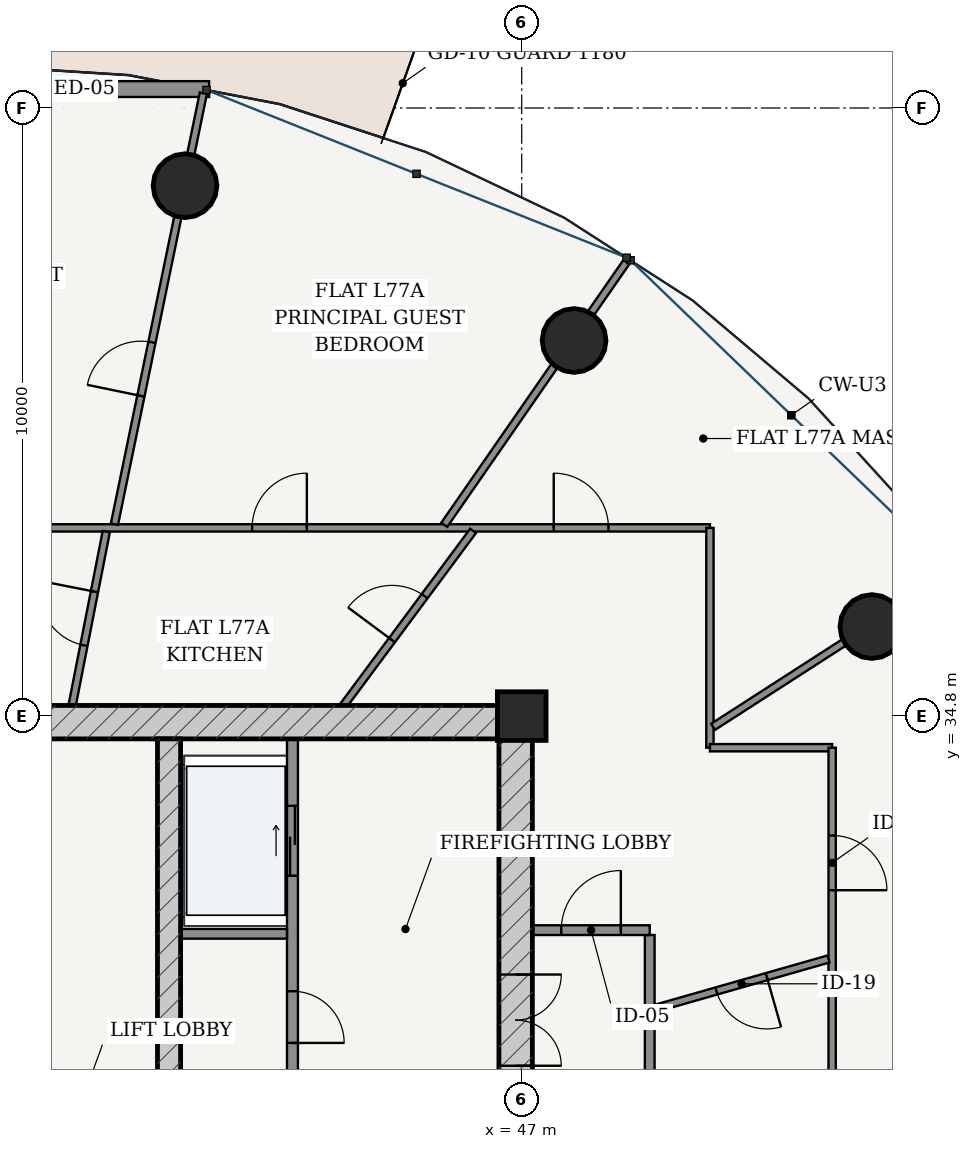
"""IFC4 building model, lengths in metres.
Left out: names, types, materials, properties, quantities, classifications, styles, units other than length and angle.
Written with IfcOpenShell. Run it as: python <this file> out.ifc"""

import sys

from ifc_helpers import new_model, si_unit, direction, frame, frame_2d, origin, origin_2d, place, context, subcontext, project, spatial, rectangle, hollow_circle, extrude, source, transform, mapped, element, fill, save


model = new_model("IFC4")
c1 = context("Model", 3, precision=1e-05, world=origin(), true_north=direction((-0.2419218956, 0.970295726276)))
c2 = subcontext(c1, "Body", "Model", "MODEL_VIEW")
j1 = project(units=[si_unit("LENGTHUNIT", "METRE"), si_unit("PLANEANGLEUNIT", "RADIAN")], contexts=[c1])
p1 = place(None, origin())
s1 = spatial("IfcSite", under=j1, at=p1, CompositionType="ELEMENT")
p2 = place(p1, origin())
s2 = spatial("IfcBuilding", under=s1, at=p2, CompositionType="ELEMENT")
p3 = place(p2, frame((0.0, 0.0, 293.2)))
s3 = spatial("IfcBuildingStorey", under=s2, at=p3, CompositionType="ELEMENT", Elevation=293.2)
p4 = place(p3, frame((47.0, 34.8, 0.0), z_axis=(0.0, 0.0, 1.0), x_axis=(1.0, 0.0, 0.0)))
e1 = element("IfcColumn", 1, at=p4, inside=s3, PredefinedType="COLUMN", context=c2, shape_type="SweptSolid", body=[
    extrude(rectangle(XDim=0.8, YDim=0.8, at=origin_2d()), origin(), (0.0, 0.0, 1.0), 3.75),
])
p5 = place(p3, frame((28.825, 34.7, 0.0), z_axis=(0.0, 0.0, 1.0), x_axis=(1.0, 0.0, 0.0)))
e2 = element("IfcWall", 2, at=p5, inside=s3, PredefinedType="SHEAR", context=c2, shape_type="SweptSolid", body=[
    extrude(rectangle(XDim=18.35, YDim=0.55, at=frame_2d((9.175, 0.0))), origin(), (0.0, 0.0, 1.0), 3.49),
])
p6 = place(p3, frame((46.9, 19.175, 0.0), z_axis=(0.0, 0.0, 1.0), x_axis=(0.0, 1.0, 0.0)))
e3 = element("IfcWall", 3, at=p6, inside=s3, PredefinedType="SHEAR", context=c2, shape_type="SweptSolid", body=[
    extrude(rectangle(XDim=15.25, YDim=0.55, at=frame_2d((7.625, 0.0))), origin(), (0.0, 0.0, 1.0), 3.49),
])
p7 = place(p6, frame((9.875, 0.0, 0.0)))
e4 = element("IfcOpeningElement", 4, at=p7, cuts=e3, PredefinedType="OPENING", context=c2, shape_type="SweptSolid", body=[
    extrude(rectangle(XDim=1.5, YDim=2.2, at=frame_2d((0.75, 1.1))), frame((0.0, 0.285, 0.0), z_axis=(0.0, -1.0, 0.0), x_axis=(1.0, 0.0, 0.0)), (0.0, 0.0, 1.0), 0.57),
])
p8 = place(p3, frame((41.2, 19.175, 0.0), z_axis=(0.0, 0.0, 1.0), x_axis=(0.0, 1.0, 0.0)))
e5 = element("IfcWall", 5, at=p8, inside=s3, PredefinedType="SHEAR", context=c2, shape_type="SweptSolid", body=[
    extrude(rectangle(XDim=15.25, YDim=0.38, at=frame_2d((7.625, 0.0))), origin(), (0.0, 0.0, 1.0), 3.49),
])
p9 = place(p8, frame((7.8, 0.0, 0.0)))
e6 = element("IfcOpeningElement", 6, at=p9, cuts=e5, PredefinedType="OPENING", context=c2, shape_type="SweptSolid", body=[
    extrude(rectangle(XDim=1.05, YDim=2.15, at=frame_2d((0.525, 1.075))), frame((0.0, 0.2, 0.0), z_axis=(0.0, -1.0, 0.0), x_axis=(1.0, 0.0, 0.0)), (0.0, 0.0, 1.0), 0.4),
])
for number, where, z_axis, x_axis in (
    (7, (52.759, 36.272, 0.0), (0.0, 0.0, 1.0), (1.0, 0.0, 0.0)),
    (8, (47.861, 40.977, 0.0), (0.0, 0.0, 1.0), (1.0, 0.0, 0.0)),
    (9, (41.463, 43.522, 0.0), (0.0, 0.0, 1.0), (1.0, 0.0, 0.0)),
):
    element("IfcColumn", number, at=place(p3, frame(where, z_axis=z_axis, x_axis=x_axis)), inside=s3, PredefinedType="COLUMN", context=c2, shape_type="SweptSolid", body=[
        extrude(hollow_circle(Radius=0.525, WallThickness=0.035, at=origin_2d()), origin(), (0.0, 0.0, 1.0), 3.75),
    ])
p10 = place(p3, frame((41.859, 45.111, 0.0), z_axis=(0.0, 0.0, 1.0), x_axis=(-1.0, 0.0, 0.0)))
e10 = element("IfcWall", 10, at=p10, inside=s3, PredefinedType="SOLIDWALL", context=c2, shape_type="SweptSolid", body=[
    extrude(rectangle(XDim=7.718, YDim=0.26, at=frame_2d((3.859, 0.0))), origin(), (0.0, 0.0, 1.0), 3.49),
])
p11 = place(p10, frame((3.184, 0.0, 0.0)))
e11 = element("IfcOpeningElement", 11, at=p11, cuts=e10, PredefinedType="OPENING", context=c2, shape_type="SweptSolid", body=[
    extrude(rectangle(XDim=1.35, YDim=2.2, at=frame_2d((0.675, 1.1))), frame((0.0, 0.14, 0.0), z_axis=(0.0, -1.0, 0.0), x_axis=(1.0, 0.0, 0.0)), (0.0, 0.0, 1.0), 0.28),
])
p12 = place(p3, frame((43.23, 28.52, 0.0), z_axis=(0.0, 0.0, 1.0), x_axis=(0.0, 1.0, 0.0)))
e12 = element("IfcWall", 12, at=p12, inside=s3, PredefinedType="PARTITIONING", context=c2, shape_type="SweptSolid", body=[
    extrude(rectangle(XDim=5.905, YDim=0.18, at=frame_2d((2.953, 0.0))), origin(), (0.0, 0.0, 1.0), 3.49),
])
p13 = place(p12, frame((0.905, 0.0, 0.0)))
e13 = element("IfcOpeningElement", 13, at=p13, cuts=e12, PredefinedType="OPENING", context=c2, shape_type="SweptSolid", body=[
    extrude(rectangle(XDim=0.85, YDim=2.1, at=frame_2d((0.425, 1.05))), frame((0.0, 0.1, 0.0), z_axis=(0.0, -1.0, 0.0), x_axis=(1.0, 0.0, 0.0)), (0.0, 0.0, 1.0), 0.2),
])
p14 = place(p12, frame((3.655, 0.0, 0.0)))
e14 = element("IfcOpeningElement", 14, at=p14, cuts=e12, PredefinedType="OPENING", context=c2, shape_type="SweptSolid", body=[
    extrude(rectangle(XDim=1.15, YDim=2.2, at=frame_2d((0.575, 1.1))), frame((0.0, 0.1, 0.0), z_axis=(0.0, -1.0, 0.0), x_axis=(1.0, 0.0, 0.0)), (0.0, 0.0, 1.0), 0.2),
])
p15 = place(p3, frame((41.39, 31.22, 0.0), z_axis=(0.0, 0.0, 1.0), x_axis=(1.0, 0.0, 0.0)))
e15 = element("IfcWall", 15, at=p15, inside=s3, PredefinedType="PARTITIONING", context=c2, shape_type="SweptSolid", body=[
    extrude(rectangle(XDim=1.75, YDim=0.16, at=frame_2d((0.875, 0.0))), origin(), (0.0, 0.0, 1.0), 3.49),
])
p16 = place(p3, frame((49.105, 17.275, 0.0), z_axis=(0.0, 0.0, 1.0), x_axis=(0.0, 1.0, 0.0)))
e16 = element("IfcWall", 16, at=p16, inside=s3, PredefinedType="PARTITIONING", context=c2, shape_type="SweptSolid", body=[
    extrude(rectangle(XDim=13.925, YDim=0.16, at=frame_2d((6.962, 0.0))), origin(), (0.0, 0.0, 1.0), 3.015),
])
p17 = place(p3, frame((47.175, 31.28, 0.0), z_axis=(0.0, 0.0, 1.0), x_axis=(1.0, 0.0, 0.0)))
e17 = element("IfcWall", 17, at=p17, inside=s3, PredefinedType="PARTITIONING", context=c2, shape_type="SweptSolid", body=[
    extrude(rectangle(XDim=1.93, YDim=0.16, at=frame_2d((0.965, 0.0))), origin(), (0.0, 0.0, 1.0), 3.49),
])
p18 = place(p17, frame((0.475, 0.0, 0.0)))
e18 = element("IfcOpeningElement", 18, at=p18, cuts=e17, PredefinedType="OPENING", context=c2, shape_type="SweptSolid", body=[
    extrude(rectangle(XDim=0.98, YDim=2.2, at=frame_2d((0.49, 1.1))), frame((0.0, 0.09, 0.0), z_axis=(0.0, -1.0, 0.0), x_axis=(1.0, 0.0, 0.0)), (0.0, 0.0, 1.0), 0.18),
])
p19 = place(p3, frame((25.905, 37.895, 0.0), z_axis=(0.0, 0.0, 1.0), x_axis=(1.0, 0.0, 0.0)))
e19 = element("IfcWall", 19, at=p19, inside=s3, PredefinedType="PARTITIONING", context=c2, shape_type="SweptSolid", body=[
    extrude(rectangle(XDim=24.19, YDim=0.12, at=frame_2d((12.095, 0.0))), origin(), (0.0, 0.0, 1.0), 3.015),
])
p20 = place(p19, frame((21.621, 0.0, 0.0)))
e20 = element("IfcOpeningElement", 20, at=p20, cuts=e19, PredefinedType="OPENING", context=c2, shape_type="SweptSolid", body=[
    extrude(rectangle(XDim=0.9, YDim=2.15, at=frame_2d((0.45, 1.075))), frame((0.0, 0.07, 0.0), z_axis=(0.0, -1.0, 0.0), x_axis=(1.0, 0.0, 0.0)), (0.0, 0.0, 1.0), 0.14),
])
p21 = place(p19, frame((16.661, 0.0, 0.0)))
e21 = element("IfcOpeningElement", 21, at=p21, cuts=e19, PredefinedType="OPENING", context=c2, shape_type="SweptSolid", body=[
    extrude(rectangle(XDim=0.9, YDim=2.15, at=frame_2d((0.45, 1.075))), frame((0.0, 0.07, 0.0), z_axis=(0.0, -1.0, 0.0), x_axis=(1.0, 0.0, 0.0)), (0.0, 0.0, 1.0), 0.14),
])
p22 = place(p19, frame((1.872, 0.0, 0.0)))
e22 = element("IfcOpeningElement", 22, at=p22, cuts=e19, PredefinedType="OPENING", context=c2, shape_type="SweptSolid", body=[
    extrude(rectangle(XDim=0.9, YDim=2.15, at=frame_2d((0.45, 1.075))), frame((0.0, 0.07, 0.0), z_axis=(0.0, -1.0, 0.0), x_axis=(1.0, 0.0, 0.0)), (0.0, 0.0, 1.0), 0.14),
])
p23 = place(p3, frame((50.095, 37.895, 0.0), z_axis=(0.0, 0.0, 1.0), x_axis=(0.0, -1.0, 0.0)))
e23 = element("IfcWall", 23, at=p23, inside=s3, PredefinedType="PARTITIONING", context=c2, shape_type="SweptSolid", body=[
    extrude(rectangle(XDim=3.615, YDim=0.12, at=frame_2d((1.808, 0.0))), origin(), (0.0, 0.0, 1.0), 3.015),
])
p24 = place(p3, frame((50.095, 34.28, 0.0), z_axis=(0.0, 0.0, 1.0), x_axis=(1.0, 0.0, 0.0)))
e24 = element("IfcWall", 24, at=p24, inside=s3, PredefinedType="PARTITIONING", context=c2, shape_type="SweptSolid", body=[
    extrude(rectangle(XDim=2.01, YDim=0.12, at=frame_2d((1.005, 0.0))), origin(), (0.0, 0.0, 1.0), 3.209),
])
p25 = place(p3, frame((52.105, 34.28, 0.0), z_axis=(0.0, 0.0, 1.0), x_axis=(0.0, -1.0, 0.0)))
e25 = element("IfcWall", 25, at=p25, inside=s3, PredefinedType="PARTITIONING", context=c2, shape_type="SweptSolid", body=[
    extrude(rectangle(XDim=10.083, YDim=0.12, at=frame_2d((5.041, 0.0))), origin(), (0.0, 0.0, 1.0), 3.015),
])
p26 = place(p25, frame((1.444, 0.0, 0.0)))
e26 = element("IfcOpeningElement", 26, at=p26, cuts=e25, PredefinedType="OPENING", context=c2, shape_type="SweptSolid", body=[
    extrude(rectangle(XDim=0.9, YDim=2.15, at=frame_2d((0.45, 1.075))), frame((0.0, 0.07, 0.0), z_axis=(0.0, -1.0, 0.0), x_axis=(1.0, 0.0, 0.0)), (0.0, 0.0, 1.0), 0.14),
])
p27 = place(p3, frame((50.147, 34.624, 0.0), z_axis=(0.0, 0.0, 1.0), x_axis=(0.840694066929, 0.541510374628, 0.0)))
e27 = element("IfcWall", 27, at=p27, inside=s3, PredefinedType="PARTITIONING", context=c2, shape_type="SweptSolid", body=[
    extrude(rectangle(XDim=4.637, YDim=0.12, at=frame_2d((2.319, 0.0))), origin(), (0.0, 0.0, 1.0), 3.015),
])
p28 = place(p3, frame((45.726, 37.946, 0.0), z_axis=(0.0, 0.0, 1.0), x_axis=(0.569678410446, 0.821867695357, 0.0)))
e28 = element("IfcWall", 28, at=p28, inside=s3, PredefinedType="PARTITIONING", context=c2, shape_type="SweptSolid", body=[
    extrude(rectangle(XDim=5.257, YDim=0.12, at=frame_2d((2.628, 0.0))), origin(), (0.0, 0.0, 1.0), 3.015),
])
p29 = place(p3, frame((40.302, 37.956, 0.0), z_axis=(0.0, 0.0, 1.0), x_axis=(0.20211361456, 0.979362081566, 0.0)))
e29 = element("IfcWall", 29, at=p29, inside=s3, PredefinedType="PARTITIONING", context=c2, shape_type="SweptSolid", body=[
    extrude(rectangle(XDim=7.237, YDim=0.12, at=frame_2d((3.618, 0.0))), origin(), (0.0, 0.0, 1.0), 3.015),
])
p30 = place(p29, frame((2.154, 0.0, 0.0)))
e30 = element("IfcOpeningElement", 30, at=p30, cuts=e29, PredefinedType="OPENING", context=c2, shape_type="SweptSolid", body=[
    extrude(rectangle(XDim=0.9, YDim=2.15, at=frame_2d((0.45, 1.075))), frame((0.0, 0.07, 0.0), z_axis=(0.0, -1.0, 0.0), x_axis=(1.0, 0.0, 0.0)), (0.0, 0.0, 1.0), 0.14),
])
p31 = place(p3, frame((49.185, 29.99, 0.0), z_axis=(0.0, 0.0, 1.0), x_axis=(0.961663207035, 0.274233251511, 0.0)))
e31 = element("IfcWall", 31, at=p31, inside=s3, PredefinedType="PARTITIONING", context=c2, shape_type="SweptSolid", body=[
    extrude(rectangle(XDim=2.974, YDim=0.12, at=frame_2d((1.487, 0.0))), origin(), (0.0, 0.0, 1.0), 3.209),
])
p32 = place(p31, frame((1.057, 0.0, 0.0)))
e32 = element("IfcOpeningElement", 32, at=p32, cuts=e31, PredefinedType="OPENING", context=c2, shape_type="SweptSolid", body=[
    extrude(rectangle(XDim=0.86, YDim=2.15, at=frame_2d((0.43, 1.075))), frame((0.0, 0.07, 0.0), z_axis=(0.0, -1.0, 0.0), x_axis=(1.0, 0.0, 0.0)), (0.0, 0.0, 1.0), 0.14),
])
p33 = place(p3, frame((44.07, 34.977, 0.0), z_axis=(0.0, 0.0, 1.0), x_axis=(0.596034582173, 0.802958764106, 0.0)))
e33 = element("IfcWall", 33, at=p33, inside=s3, PredefinedType="PARTITIONING", context=c2, shape_type="SweptSolid", body=[
    extrude(rectangle(XDim=3.573, YDim=0.12, at=frame_2d((1.786, 0.0))), origin(), (0.0, 0.0, 1.0), 3.49),
])
p34 = place(p33, frame((1.336, 0.0, 0.0)))
e34 = element("IfcOpeningElement", 34, at=p34, cuts=e33, PredefinedType="OPENING", context=c2, shape_type="SweptSolid", body=[
    extrude(rectangle(XDim=0.9, YDim=2.15, at=frame_2d((0.45, 1.075))), frame((0.0, 0.07, 0.0), z_axis=(0.0, -1.0, 0.0), x_axis=(1.0, 0.0, 0.0)), (0.0, 0.0, 1.0), 0.14),
])
p35 = place(p3, frame((39.607, 34.977, 0.0), z_axis=(0.0, 0.0, 1.0), x_axis=(0.192841890083, 0.981229843324, 0.0)))
e35 = element("IfcWall", 35, at=p35, inside=s3, PredefinedType="PARTITIONING", context=c2, shape_type="SweptSolid", body=[
    extrude(rectangle(XDim=2.912, YDim=0.12, at=frame_2d((1.456, 0.0))), origin(), (0.0, 0.0, 1.0), 2.575),
])
p36 = place(p35, frame((1.006, 0.0, 0.0)))
e36 = element("IfcOpeningElement", 36, at=p36, cuts=e35, PredefinedType="OPENING", context=c2, shape_type="SweptSolid", body=[
    extrude(rectangle(XDim=0.9, YDim=2.15, at=frame_2d((0.45, 1.075))), frame((0.0, 0.07, 0.0), z_axis=(0.0, -1.0, 0.0), x_axis=(1.0, 0.0, 0.0)), (0.0, 0.0, 1.0), 0.14),
])
m1 = source(origin(), c2, "Body", "SweptSolid", [
    extrude(rectangle(XDim=1.5, YDim=2.2, at=frame_2d((0.75, 1.1))), frame((0.0, 0.025, 0.0), z_axis=(0.0, -1.0, 0.0), x_axis=(1.0, 0.0, 0.0)), (0.0, 0.0, 1.0), 0.05),
])
p37 = place(p7, frame((1.5, 0.0, 0.0), z_axis=(0.0, 0.0, 1.0), x_axis=(-1.0, 0.0, 0.0)))
e37 = element("IfcDoor", 37, at=p37, inside=s3, OperationType="DOUBLE_DOOR_SINGLE_SWING", PredefinedType="DOOR", context=c2, shape_type="MappedRepresentation", body=[
    mapped(m1, transform((0.0, 0.0, 0.0), scale=1.0)),
])
fill(e4, e37)
m2 = source(origin(), c2, "Body", "SweptSolid", [
    extrude(rectangle(XDim=0.85, YDim=2.1, at=frame_2d((0.425, 1.05))), frame((0.0, 0.025, 0.0), z_axis=(0.0, -1.0, 0.0), x_axis=(1.0, 0.0, 0.0)), (0.0, 0.0, 1.0), 0.05),
])
p38 = place(p13, frame((0.85, 0.0, 0.0), z_axis=(0.0, 0.0, 1.0), x_axis=(-1.0, 0.0, 0.0)))
e38 = element("IfcDoor", 38, at=p38, inside=s3, OperationType="SINGLE_SWING_RIGHT", PredefinedType="DOOR", context=c2, shape_type="MappedRepresentation", body=[
    mapped(m2, transform((0.0, 0.0, 0.0), scale=1.0)),
])
fill(e13, e38)
m3 = source(origin(), c2, "Body", "SweptSolid", [
    extrude(rectangle(XDim=1.15, YDim=2.2, at=frame_2d((0.575, 1.1))), frame((0.0, 0.025, 0.0), z_axis=(0.0, -1.0, 0.0), x_axis=(1.0, 0.0, 0.0)), (0.0, 0.0, 1.0), 0.05),
])
p39 = place(p14, origin())
e39 = element("IfcDoor", 39, at=p39, inside=s3, OperationType="DOUBLE_DOOR_SLIDING", PredefinedType="DOOR", context=c2, shape_type="MappedRepresentation", body=[
    mapped(m3, transform((0.0, 0.0, 0.0), scale=1.0)),
])
fill(e14, e39)
m4 = source(origin(), c2, "Body", "SweptSolid", [
    extrude(rectangle(XDim=0.98, YDim=2.2, at=frame_2d((0.49, 1.1))), frame((0.0, 0.025, 0.0), z_axis=(0.0, -1.0, 0.0), x_axis=(1.0, 0.0, 0.0)), (0.0, 0.0, 1.0), 0.05),
])
p40 = place(p18, origin())
e40 = element("IfcDoor", 40, at=p40, inside=s3, OperationType="SINGLE_SWING_RIGHT", PredefinedType="DOOR", context=c2, shape_type="MappedRepresentation", body=[
    mapped(m4, transform((0.0, 0.0, 0.0), scale=1.0)),
])
fill(e18, e40)
m5 = source(origin(), c2, "Body", "SweptSolid", [
    extrude(rectangle(XDim=0.86, YDim=2.15, at=frame_2d((0.43, 1.075))), frame((0.0, 0.025, 0.0), z_axis=(0.0, -1.0, 0.0), x_axis=(1.0, 0.0, 0.0)), (0.0, 0.0, 1.0), 0.05),
])
p41 = place(p32, frame((0.86, 0.0, 0.0), z_axis=(0.0, 0.0, 1.0), x_axis=(-1.0, 0.0, 0.0)))
e41 = element("IfcDoor", 41, at=p41, inside=s3, OperationType="SINGLE_SWING_LEFT", PredefinedType="DOOR", context=c2, shape_type="MappedRepresentation", body=[
    mapped(m5, transform((0.0, 0.0, 0.0), scale=1.0)),
])
fill(e32, e41)
m6 = source(origin(), c2, "Body", "SweptSolid", [
    extrude(rectangle(XDim=0.9, YDim=2.15, at=frame_2d((0.45, 1.075))), frame((0.0, 0.025, 0.0), z_axis=(0.0, -1.0, 0.0), x_axis=(1.0, 0.0, 0.0)), (0.0, 0.0, 1.0), 0.05),
])
p42 = place(p26, origin())
e42 = element("IfcDoor", 42, at=p42, inside=s3, OperationType="SINGLE_SWING_RIGHT", PredefinedType="DOOR", context=c2, shape_type="MappedRepresentation", body=[
    mapped(m6, transform((0.0, 0.0, 0.0), scale=1.0)),
])
fill(e26, e42)
p43 = place(p34, origin())
e43 = element("IfcDoor", 43, at=p43, inside=s3, OperationType="SINGLE_SWING_LEFT", PredefinedType="DOOR", context=c2, shape_type="MappedRepresentation", body=[
    mapped(m6, transform((0.0, 0.0, 0.0), scale=1.0)),
])
fill(e34, e43)
p44 = place(p36, origin())
e44 = element("IfcDoor", 44, at=p44, inside=s3, OperationType="SINGLE_SWING_RIGHT", PredefinedType="DOOR", context=c2, shape_type="MappedRepresentation", body=[
    mapped(m6, transform((0.0, 0.0, 0.0), scale=1.0)),
])
fill(e36, e44)
p45 = place(p20, origin())
e45 = element("IfcDoor", 45, at=p45, inside=s3, OperationType="SINGLE_SWING_LEFT", PredefinedType="DOOR", context=c2, shape_type="MappedRepresentation", body=[
    mapped(m6, transform((0.0, 0.0, 0.0), scale=1.0)),
])
fill(e20, e45)
p46 = place(p21, origin())
e46 = element("IfcDoor", 46, at=p46, inside=s3, OperationType="SINGLE_SWING_RIGHT", PredefinedType="DOOR", context=c2, shape_type="MappedRepresentation", body=[
    mapped(m6, transform((0.0, 0.0, 0.0), scale=1.0)),
])
fill(e21, e46)
p47 = place(p30, origin())
e47 = element("IfcDoor", 47, at=p47, inside=s3, OperationType="SINGLE_SWING_LEFT", PredefinedType="DOOR", context=c2, shape_type="MappedRepresentation", body=[
    mapped(m6, transform((0.0, 0.0, 0.0), scale=1.0)),
])
fill(e30, e47)
save(model, sys.argv[1])
